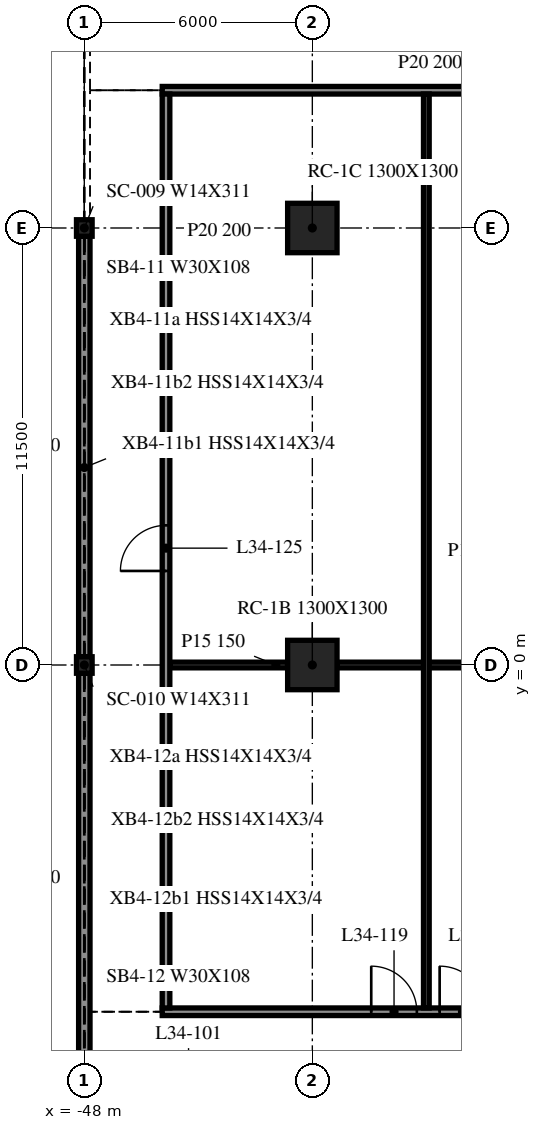
"""IFC4 building model, lengths in metres.
Left out: names, types, materials, properties, quantities, classifications, styles, units other than length and angle.
Written with IfcOpenShell. Run it as: python <this file> out.ifc"""

import sys

from ifc_helpers import new_model, si_unit, direction, frame, frame_2d, origin, origin_2d, place, context, subcontext, project, spatial, rectangle, i_section, extrude, element, fill, save


model = new_model("IFC4")
c1 = context("Model", 3, precision=1e-05, world=origin(), true_north=direction((0.0, 1.0)))
c2 = subcontext(c1, "Body", "Model", "MODEL_VIEW")
j1 = project(units=[si_unit("LENGTHUNIT", "METRE"), si_unit("PLANEANGLEUNIT", "RADIAN")], contexts=[c1])
p1 = place(None, origin())
s1 = spatial("IfcSite", under=j1, at=p1, CompositionType="ELEMENT")
p2 = place(p1, origin())
s2 = spatial("IfcBuilding", under=s1, at=p2, CompositionType="ELEMENT")
p3 = place(p2, frame((0.0, 0.0, 146.6)))
s3 = spatial("IfcBuildingStorey", under=s2, at=p3, CompositionType="ELEMENT", Elevation=146.6)
for number, where, z_axis, x_axis in (
    (1, (-42.0, 0.0, -0.34), (0.0, 0.0, 1.0), (1.0, 0.0, 0.0)),
    (2, (-42.0, 11.5, -0.34), (0.0, 0.0, 1.0), (1.0, 0.0, 0.0)),
):
    element("IfcColumn", number, at=place(p3, frame(where, z_axis=z_axis, x_axis=x_axis)), inside=s3, PredefinedType="COLUMN", context=c2, shape_type="SweptSolid", body=[
        extrude(rectangle(XDim=1.3, YDim=1.3, at=origin_2d()), origin(), (0.0, 0.0, 1.0), 4.1),
    ])
for number, where, z_axis, x_axis in (
    (3, (-48.0, 11.5, -0.34), (0.0, 0.0, 1.0), (1.0, 0.0, 0.0)),
    (4, (-48.0, 0.0, -0.34), (0.0, 0.0, 1.0), (1.0, 0.0, 0.0)),
):
    element("IfcColumn", number, at=place(p3, frame(where, z_axis=z_axis, x_axis=x_axis)), inside=s3, PredefinedType="COLUMN", context=c2, shape_type="SweptSolid", body=[
        extrude(i_section(OverallWidth=0.412, OverallDepth=0.434, WebThickness=0.036, FlangeThickness=0.057, at=origin_2d()), origin(), (0.0, 0.0, 1.0), 4.1),
    ])
p4 = place(p3, frame((-48.0, 11.282, 0.0), z_axis=(0.0, 0.0, 1.0), x_axis=(0.0, -1.0, 0.0)))
e5 = element("IfcWall", 5, at=p4, inside=s3, PredefinedType="NOTDEFINED", context=c2, shape_type="SweptSolid", body=[
    extrude(rectangle(XDim=11.064, YDim=0.3, at=frame_2d((5.532, 0.0))), origin(), (0.0, 0.0, 1.0), 3.003),
])
p5 = place(p3, frame((-48.0, -0.218, 0.0), z_axis=(0.0, 0.0, 1.0), x_axis=(0.0, -1.0, 0.0)))
e6 = element("IfcWall", 6, at=p5, inside=s3, PredefinedType="NOTDEFINED", context=c2, shape_type="SweptSolid", body=[
    extrude(rectangle(XDim=10.782, YDim=0.3, at=frame_2d((5.391, 0.0))), origin(), (0.0, 0.0, 1.0), 3.003),
])
p6 = place(p3, frame((-45.95, -9.125, 0.0), z_axis=(0.0, 0.0, 1.0), x_axis=(1.0, 0.0, 0.0)))
e7 = element("IfcWall", 7, at=p6, inside=s3, PredefinedType="PARTITIONING", context=c2, shape_type="SweptSolid", body=[
    extrude(rectangle(XDim=14.1, YDim=0.2, at=frame_2d((7.05, 0.0))), origin(), (0.0, 0.0, 1.0), 3.76),
])
p7 = place(p6, frame((5.5, 0.0, 0.0)))
e8 = element("IfcOpeningElement", 8, at=p7, cuts=e7, PredefinedType="OPENING", context=c2, shape_type="SweptSolid", body=[
    extrude(rectangle(XDim=1.2, YDim=2.1, at=frame_2d((0.6, 1.05))), frame((0.0, 0.11, 0.0), z_axis=(0.0, -1.0, 0.0), x_axis=(1.0, 0.0, 0.0)), (0.0, 0.0, 1.0), 0.22),
])
p8 = place(p6, frame((7.3, 0.0, 0.0)))
e9 = element("IfcOpeningElement", 9, at=p8, cuts=e7, PredefinedType="OPENING", context=c2, shape_type="SweptSolid", body=[
    extrude(rectangle(XDim=1.2, YDim=2.1, at=frame_2d((0.6, 1.05))), frame((0.0, 0.11, 0.0), z_axis=(0.0, -1.0, 0.0), x_axis=(1.0, 0.0, 0.0)), (0.0, 0.0, 1.0), 0.22),
])
p9 = place(p3, frame((-45.75, 0.0, 0.0), z_axis=(0.0, 0.0, 1.0), x_axis=(1.0, 0.0, 0.0)))
e10 = element("IfcWall", 10, at=p9, inside=s3, PredefinedType="PARTITIONING", context=c2, shape_type="SweptSolid", body=[
    extrude(rectangle(XDim=3.1, YDim=0.15, at=frame_2d((1.55, 0.0))), origin(), (0.0, 0.0, 1.0), 3.76),
])
p10 = place(p3, frame((-41.35, 0.0, 0.0), z_axis=(0.0, 0.0, 1.0), x_axis=(1.0, 0.0, 0.0)))
e11 = element("IfcWall", 11, at=p10, inside=s3, PredefinedType="PARTITIONING", context=c2, shape_type="SweptSolid", body=[
    extrude(rectangle(XDim=9.3, YDim=0.15, at=frame_2d((4.65, 0.0))), origin(), (0.0, 0.0, 1.0), 3.76),
])
p11 = place(p3, frame((-45.95, 15.125, 0.0), z_axis=(0.0, 0.0, 1.0), x_axis=(1.0, 0.0, 0.0)))
e12 = element("IfcWall", 12, at=p11, inside=s3, PredefinedType="PARTITIONING", context=c2, shape_type="SweptSolid", body=[
    extrude(rectangle(XDim=14.1, YDim=0.2, at=frame_2d((7.05, 0.0))), origin(), (0.0, 0.0, 1.0), 3.76),
])
p12 = place(p3, frame((-45.85, -9.025, 0.0), z_axis=(0.0, 0.0, 1.0), x_axis=(0.0, 1.0, 0.0)))
e13 = element("IfcWall", 13, at=p12, inside=s3, PredefinedType="PARTITIONING", context=c2, shape_type="SweptSolid", body=[
    extrude(rectangle(XDim=24.05, YDim=0.2, at=frame_2d((12.025, 0.0))), origin(), (0.0, 0.0, 1.0), 3.76),
])
p13 = place(p12, frame((11.5, 0.0, 0.0)))
e14 = element("IfcOpeningElement", 14, at=p13, cuts=e13, PredefinedType="OPENING", context=c2, shape_type="SweptSolid", body=[
    extrude(rectangle(XDim=1.2, YDim=2.1, at=frame_2d((0.6, 1.05))), frame((0.0, 0.11, 0.0), z_axis=(0.0, -1.0, 0.0), x_axis=(1.0, 0.0, 0.0)), (0.0, 0.0, 1.0), 0.22),
])
p14 = place(p3, frame((-39.0, -9.025, 0.0), z_axis=(0.0, 0.0, 1.0), x_axis=(0.0, 1.0, 0.0)))
e15 = element("IfcWall", 15, at=p14, inside=s3, PredefinedType="PARTITIONING", context=c2, shape_type="SweptSolid", body=[
    extrude(rectangle(XDim=24.05, YDim=0.15, at=frame_2d((12.025, 0.0))), origin(), (0.0, 0.0, 1.0), 3.76),
])
p15 = place(p7, origin())
e16 = element("IfcDoor", 16, at=p15, inside=s3, OperationType="SINGLE_SWING_LEFT", PredefinedType="DOOR", context=c2, shape_type="SweptSolid", body=[
    extrude(rectangle(XDim=1.2, YDim=2.1, at=frame_2d((0.6, 1.05))), frame((0.0, 0.025, 0.0), z_axis=(0.0, -1.0, 0.0), x_axis=(1.0, 0.0, 0.0)), (0.0, 0.0, 1.0), 0.05),
])
fill(e8, e16)
p16 = place(p8, origin())
e17 = element("IfcDoor", 17, at=p16, inside=s3, OperationType="SINGLE_SWING_RIGHT", PredefinedType="DOOR", context=c2, shape_type="SweptSolid", body=[
    extrude(rectangle(XDim=1.2, YDim=2.1, at=frame_2d((0.6, 1.05))), frame((0.0, 0.025, 0.0), z_axis=(0.0, -1.0, 0.0), x_axis=(1.0, 0.0, 0.0)), (0.0, 0.0, 1.0), 0.05),
])
fill(e9, e17)
p17 = place(p13, origin())
e18 = element("IfcDoor", 18, at=p17, inside=s3, OperationType="SINGLE_SWING_LEFT", PredefinedType="DOOR", context=c2, shape_type="SweptSolid", body=[
    extrude(rectangle(XDim=1.2, YDim=2.1, at=frame_2d((0.6, 1.05))), frame((0.0, 0.025, 0.0), z_axis=(0.0, -1.0, 0.0), x_axis=(1.0, 0.0, 0.0)), (0.0, 0.0, 1.0), 0.05),
])
fill(e14, e18)
save(model, sys.argv[1])
